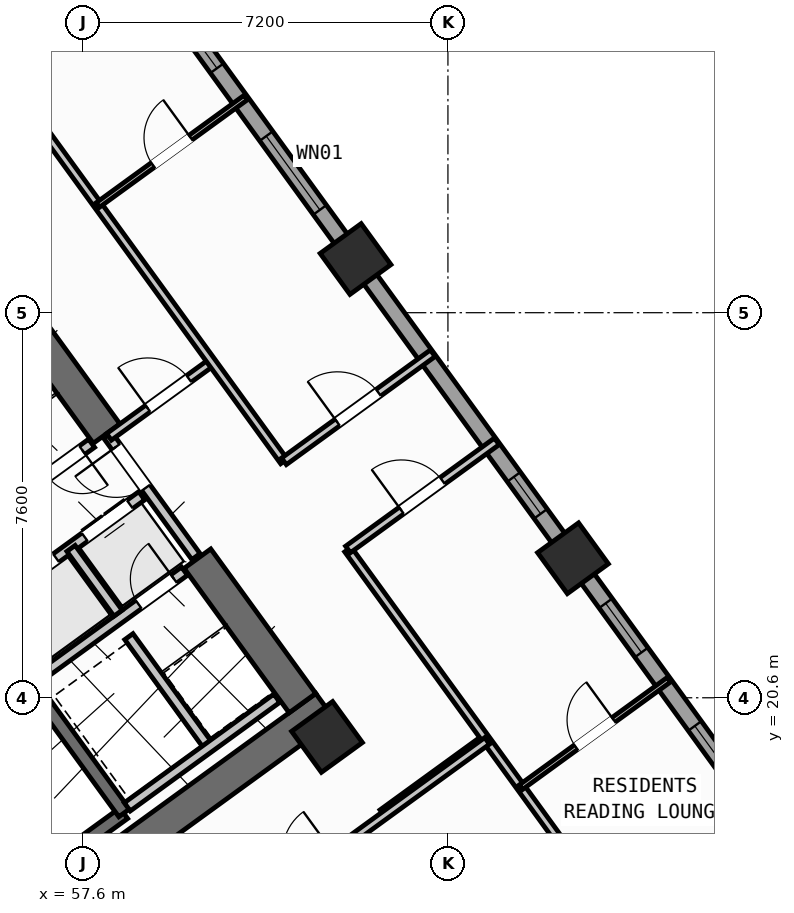
"""IFC4 building model, lengths in metres.
Left out: names, types, materials, properties, quantities, classifications, styles, units other than length and angle.
Written with IfcOpenShell. Run it as: python <this file> out.ifc"""

import sys

from ifc_helpers import new_model, si_unit, direction, frame, frame_2d, origin, origin_2d, place, context, subcontext, project, spatial, rectangle, hollow_rectangle, extrude, source, transform, mapped, element, fill, save


model = new_model("IFC4")
c1 = context("Model", 3, precision=1e-05, world=origin(), true_north=direction((0.0, 1.0)))
c2 = subcontext(c1, "Body", "Model", "MODEL_VIEW")
j1 = project(units=[si_unit("LENGTHUNIT", "METRE"), si_unit("PLANEANGLEUNIT", "RADIAN")], contexts=[c1])
p1 = place(None, origin())
s1 = spatial("IfcSite", under=j1, at=p1, CompositionType="ELEMENT")
p2 = place(p1, origin())
s2 = spatial("IfcBuilding", under=s1, at=p2, CompositionType="ELEMENT")
p3 = place(p2, frame((0.0, 0.0, 56.4)))
s3 = spatial("IfcBuildingStorey", under=s2, at=p3, CompositionType="ELEMENT", Elevation=56.4)
p4 = place(p3, frame((52.318, 13.11, 0.0), z_axis=(0.0, 0.0, 1.0), x_axis=(0.809019445368, 0.587781878776, 0.0)))
e1 = element("IfcWall", 1, at=p4, inside=s3, PredefinedType="SHEAR", context=c2, shape_type="SweptSolid", body=[
    extrude(rectangle(XDim=12.44, YDim=0.65, at=frame_2d((6.22, 0.0))), origin(), (0.0, 0.0, 1.0), 3.35),
])
p5 = place(p3, frame((61.929, 20.494, 0.0), z_axis=(0.0, 0.0, 1.0), x_axis=(-0.58782982593, 0.808984607855, 0.0)))
e2 = element("IfcWall", 2, at=p5, inside=s3, PredefinedType="SHEAR", context=c2, shape_type="SweptSolid", body=[
    extrude(rectangle(XDim=3.525, YDim=0.65, at=frame_2d((1.762, 0.0))), origin(), (0.0, 0.0, 1.0), 3.35),
])
p6 = place(p3, frame((58.064, 25.813, 0.0), z_axis=(0.0, 0.0, 1.0), x_axis=(-0.58777996584, 0.809020835181, 0.0)))
e3 = element("IfcWall", 3, at=p6, inside=s3, PredefinedType="SHEAR", context=c2, shape_type="SweptSolid", body=[
    extrude(rectangle(XDim=6.375, YDim=0.65, at=frame_2d((3.188, 0.0))), origin(), (0.0, 0.0, 1.0), 3.35),
])
m1 = source(origin(), c2, "Body", "SweptSolid", [
    extrude(hollow_rectangle(XDim=1.0, YDim=1.0, WallThickness=0.04, at=origin_2d()), origin(), (0.0, 0.0, 1.0), 3.6),
])
for number, where, z_axis, x_axis in (
    (4, (62.414, 19.827, 0.0), (0.0, 0.0, 1.0), (0.809, 0.588, 0.0)),
    (5, (67.268, 23.354, 0.0), (0.0, 0.0, 1.0), (0.809, 0.588, 0.0)),
    (6, (62.977, 29.259, 0.0), (0.0, 0.0, 1.0), (0.809, 0.588, 0.0)),
):
    element("IfcColumn", number, at=place(p3, frame(where, z_axis=z_axis, x_axis=x_axis)), inside=s3, PredefinedType="COLUMN", context=c2, shape_type="MappedRepresentation", body=[
        mapped(m1, transform((0.0, 0.0, 0.0), scale=1.0)),
    ])
p7 = place(p3, frame((43.938, 25.192, 0.0), z_axis=(0.0, 0.0, 1.0), x_axis=(0.809016324578, 0.587786174187, 0.0)))
e7 = element("IfcWall", 7, at=p7, inside=s3, PredefinedType="STANDARD", context=c2, shape_type="SweptSolid", body=[
    extrude(rectangle(XDim=17.587, YDim=0.32, at=frame_2d((8.794, 0.0))), origin(), (0.0, 0.0, 1.0), 3.35),
])
p8 = place(p7, frame((14.914, 0.0, 0.0)))
e8 = element("IfcOpeningElement", 8, at=p8, cuts=e7, PredefinedType="OPENING", context=c2, shape_type="SweptSolid", body=[
    extrude(rectangle(XDim=1.05, YDim=2.15, at=frame_2d((0.525, 1.075))), frame((0.0, 0.17, 0.0), z_axis=(0.0, -1.0, 0.0), x_axis=(1.0, 0.0, 0.0)), (0.0, 0.0, 1.0), 0.34),
])
p9 = place(p7, frame((2.169, 0.0, 0.8)))
e9 = element("IfcOpeningElement", 9, at=p9, cuts=e7, PredefinedType="OPENING", context=c2, shape_type="SweptSolid", body=[
    extrude(rectangle(XDim=2.1, YDim=1.55, at=frame_2d((1.05, 0.775))), frame((0.0, 0.17, 0.0), z_axis=(0.0, -1.0, 0.0), x_axis=(1.0, 0.0, 0.0)), (0.0, 0.0, 1.0), 0.34),
])
p10 = place(p7, frame((7.319, 0.0, 0.8)))
e10 = element("IfcOpeningElement", 10, at=p10, cuts=e7, PredefinedType="OPENING", context=c2, shape_type="SweptSolid", body=[
    extrude(rectangle(XDim=2.1, YDim=1.55, at=frame_2d((1.05, 0.775))), frame((0.0, 0.17, 0.0), z_axis=(0.0, -1.0, 0.0), x_axis=(1.0, 0.0, 0.0)), (0.0, 0.0, 1.0), 0.34),
])
p11 = place(p3, frame((58.455, 35.484, 0.0), z_axis=(0.0, 0.0, 1.0), x_axis=(0.587783625747, -0.809018176127, 0.0)))
e11 = element("IfcWall", 11, at=p11, inside=s3, PredefinedType="STANDARD", context=c2, shape_type="SweptSolid", body=[
    extrude(rectangle(XDim=21.587, YDim=0.32, at=frame_2d((10.794, 0.0))), origin(), (0.0, 0.0, 1.0), 2.725),
])
p12 = place(p11, frame((1.54, 0.0, 0.85)))
e12 = element("IfcOpeningElement", 12, at=p12, cuts=e11, PredefinedType="OPENING", context=c2, shape_type="SweptSolid", body=[
    extrude(rectangle(XDim=1.5, YDim=1.5, at=frame_2d((0.75, 0.75))), frame((0.0, 0.17, 0.0), z_axis=(0.0, -1.0, 0.0), x_axis=(1.0, 0.0, 0.0)), (0.0, 0.0, 1.0), 0.34),
])
p13 = place(p11, frame((4.695, 0.0, 0.85)))
e13 = element("IfcOpeningElement", 13, at=p13, cuts=e11, PredefinedType="OPENING", context=c2, shape_type="SweptSolid", body=[
    extrude(rectangle(XDim=1.8, YDim=1.5, at=frame_2d((0.9, 0.75))), frame((0.0, 0.17, 0.0), z_axis=(0.0, -1.0, 0.0), x_axis=(1.0, 0.0, 0.0)), (0.0, 0.0, 1.0), 0.34),
])
p14 = place(p11, frame((13.009, 0.0, 1.0)))
e14 = element("IfcOpeningElement", 14, at=p14, cuts=e11, PredefinedType="OPENING", context=c2, shape_type="SweptSolid", body=[
    extrude(rectangle(XDim=0.9, YDim=1.25, at=frame_2d((0.45, 0.625))), frame((0.0, 0.17, 0.0), z_axis=(0.0, -1.0, 0.0), x_axis=(1.0, 0.0, 0.0)), (0.0, 0.0, 1.0), 0.34),
])
p15 = place(p11, frame((16.092, 0.0, 0.95)))
e15 = element("IfcOpeningElement", 15, at=p15, cuts=e11, PredefinedType="OPENING", context=c2, shape_type="SweptSolid", body=[
    extrude(rectangle(XDim=1.2, YDim=1.4, at=frame_2d((0.6, 0.7))), frame((0.0, 0.17, 0.0), z_axis=(0.0, -1.0, 0.0), x_axis=(1.0, 0.0, 0.0)), (0.0, 0.0, 1.0), 0.34),
])
p16 = place(p11, frame((19.085, 0.0, 1.0)))
e16 = element("IfcOpeningElement", 16, at=p16, cuts=e11, PredefinedType="OPENING", context=c2, shape_type="SweptSolid", body=[
    extrude(rectangle(XDim=0.9, YDim=1.25, at=frame_2d((0.45, 0.625))), frame((0.0, 0.17, 0.0), z_axis=(0.0, -1.0, 0.0), x_axis=(1.0, 0.0, 0.0)), (0.0, 0.0, 1.0), 0.34),
])
p17 = place(p3, frame((52.472, 14.013, 0.0), z_axis=(0.0, 0.0, 1.0), x_axis=(0.809028366311, 0.587769599847, 0.0)))
e17 = element("IfcWall", 17, at=p17, inside=s3, PredefinedType="SHEAR", context=c2, shape_type="SweptSolid", body=[
    extrude(rectangle(XDim=7.33, YDim=0.26, at=frame_2d((3.665, 0.0))), origin(), (0.0, 0.0, 1.0), 3.35),
])
p18 = place(p3, frame((58.41, 18.327, 0.0), z_axis=(0.0, 0.0, 1.0), x_axis=(-0.58776738483, 0.809029975545, 0.0)))
e18 = element("IfcWall", 18, at=p18, inside=s3, PredefinedType="SHEAR", context=c2, shape_type="SweptSolid", body=[
    extrude(rectangle(XDim=3.16, YDim=0.26, at=frame_2d((1.58, 0.0))), origin(), (0.0, 0.0, 1.0), 3.35),
])
p19 = place(p3, frame((56.553, 20.884, 0.0), z_axis=(0.0, 0.0, 1.0), x_axis=(0.809035789462, 0.587759382205, 0.0)))
e19 = element("IfcWall", 19, at=p19, inside=s3, PredefinedType="STANDARD", context=c2, shape_type="SweptSolid", body=[
    extrude(rectangle(XDim=3.768, YDim=0.2, at=frame_2d((1.884, 0.0))), origin(), (0.0, 0.0, 1.0), 3.34),
])
p20 = place(p19, frame((2.65, 0.0, 0.0)))
e20 = element("IfcOpeningElement", 20, at=p20, cuts=e19, PredefinedType="OPENING", context=c2, shape_type="SweptSolid", body=[
    extrude(rectangle(XDim=0.86, YDim=2.05, at=frame_2d((0.43, 1.025))), frame((0.0, 0.11, 0.0), z_axis=(0.0, -1.0, 0.0), x_axis=(1.0, 0.0, 0.0)), (0.0, 0.0, 1.0), 0.22),
])
p21 = place(p3, frame((54.421, 21.436, 0.0), z_axis=(0.0, 0.0, 1.0), x_axis=(0.809013710463, 0.587789772183, 0.0)))
e21 = element("IfcWall", 21, at=p21, inside=s3, PredefinedType="STANDARD", context=c2, shape_type="SweptSolid", body=[
    extrude(rectangle(XDim=5.36, YDim=0.2, at=frame_2d((2.68, 0.0))), origin(), (0.0, 0.0, 1.0), 3.34),
])
p22 = place(p21, frame((0.37, 0.0, 0.0)))
e22 = element("IfcOpeningElement", 22, at=p22, cuts=e21, PredefinedType="OPENING", context=c2, shape_type="SweptSolid", body=[
    extrude(rectangle(XDim=1.1, YDim=2.15, at=frame_2d((0.55, 1.075))), frame((0.0, 0.11, 0.0), z_axis=(0.0, -1.0, 0.0), x_axis=(1.0, 0.0, 0.0)), (0.0, 0.0, 1.0), 0.22),
])
p23 = place(p21, frame((2.17, 0.0, 0.0)))
e23 = element("IfcOpeningElement", 23, at=p23, cuts=e21, PredefinedType="OPENING", context=c2, shape_type="SweptSolid", body=[
    extrude(rectangle(XDim=1.1, YDim=2.15, at=frame_2d((0.55, 1.075))), frame((0.0, 0.11, 0.0), z_axis=(0.0, -1.0, 0.0), x_axis=(1.0, 0.0, 0.0)), (0.0, 0.0, 1.0), 0.22),
])
p24 = place(p21, frame((3.97, 0.0, 0.0)))
e24 = element("IfcOpeningElement", 24, at=p24, cuts=e21, PredefinedType="OPENING", context=c2, shape_type="SweptSolid", body=[
    extrude(rectangle(XDim=1.1, YDim=2.15, at=frame_2d((0.55, 1.075))), frame((0.0, 0.11, 0.0), z_axis=(0.0, -1.0, 0.0), x_axis=(1.0, 0.0, 0.0)), (0.0, 0.0, 1.0), 0.22),
])
p25 = place(p3, frame((58.29, 22.27, 0.0), z_axis=(0.0, 0.0, 1.0), x_axis=(-0.587840865826, 0.808976585857, 0.0)))
e25 = element("IfcWall", 25, at=p25, inside=s3, PredefinedType="STANDARD", context=c2, shape_type="SweptSolid", body=[
    extrude(rectangle(XDim=1.58, YDim=0.2, at=frame_2d((0.79, 0.0))), origin(), (0.0, 0.0, 1.0), 3.34),
])
p26 = place(p3, frame((60.067, 19.655, 0.0), z_axis=(0.0, 0.0, 1.0), x_axis=(-0.587800520745, 0.809005900975, 0.0)))
e26 = element("IfcWall", 26, at=p26, inside=s3, PredefinedType="STANDARD", context=c2, shape_type="SweptSolid", body=[
    extrude(rectangle(XDim=2.66, YDim=0.2, at=frame_2d((1.33, 0.0))), origin(), (0.0, 0.0, 1.0), 3.34),
])
p27 = place(p3, frame((58.472, 18.447, 0.0), z_axis=(0.0, 0.0, 1.0), x_axis=(0.809022487728, 0.587777691266, 0.0)))
e27 = element("IfcWall", 27, at=p27, inside=s3, PredefinedType="STANDARD", context=c2, shape_type="SweptSolid", body=[
    extrude(rectangle(XDim=3.648, YDim=0.2, at=frame_2d((1.824, 0.0))), origin(), (0.0, 0.0, 1.0), 3.34),
])
p28 = place(p3, frame((53.425, 22.468, 0.0), z_axis=(0.0, 0.0, 1.0), x_axis=(0.80902705128, 0.587771409902, 0.0)))
e28 = element("IfcWall", 28, at=p28, inside=s3, PredefinedType="STANDARD", context=c2, shape_type="SweptSolid", body=[
    extrude(rectangle(XDim=5.368, YDim=0.2, at=frame_2d((2.684, 0.0))), origin(), (0.0, 0.0, 1.0), 3.34),
])
p29 = place(p28, frame((4.28, 0.0, 0.0)))
e29 = element("IfcOpeningElement", 29, at=p29, cuts=e28, PredefinedType="OPENING", context=c2, shape_type="SweptSolid", body=[
    extrude(rectangle(XDim=0.86, YDim=2.05, at=frame_2d((0.43, 1.025))), frame((0.0, 0.11, 0.0), z_axis=(0.0, -1.0, 0.0), x_axis=(1.0, 0.0, 0.0)), (0.0, 0.0, 1.0), 0.22),
])
p30 = place(p28, frame((1.45, 0.0, 0.0)))
e30 = element("IfcOpeningElement", 30, at=p30, cuts=e28, PredefinedType="OPENING", context=c2, shape_type="SweptSolid", body=[
    extrude(rectangle(XDim=0.86, YDim=2.05, at=frame_2d((0.43, 1.025))), frame((0.0, 0.11, 0.0), z_axis=(0.0, -1.0, 0.0), x_axis=(1.0, 0.0, 0.0)), (0.0, 0.0, 1.0), 0.22),
])
p31 = place(p3, frame((59.827, 23.386, 0.0), z_axis=(0.0, 0.0, 1.0), x_axis=(-0.587803840107, 0.809003489211, 0.0)))
e31 = element("IfcWall", 31, at=p31, inside=s3, PredefinedType="STANDARD", context=c2, shape_type="SweptSolid", body=[
    extrude(rectangle(XDim=2.96, YDim=0.2, at=frame_2d((1.48, 0.0))), origin(), (0.0, 0.0, 1.0), 3.34),
])
p32 = place(p31, frame((1.68, 0.0, 0.0)))
e32 = element("IfcOpeningElement", 32, at=p32, cuts=e31, PredefinedType="OPENING", context=c2, shape_type="SweptSolid", body=[
    extrude(rectangle(XDim=1.0, YDim=2.1, at=frame_2d((0.5, 1.05))), frame((0.0, 0.11, 0.0), z_axis=(0.0, -1.0, 0.0), x_axis=(1.0, 0.0, 0.0)), (0.0, 0.0, 1.0), 0.22),
])
p33 = place(p3, frame((63.507, 18.322, 0.0), z_axis=(0.0, 0.0, 1.0), x_axis=(0.809034604122, 0.587761013791, 0.0)))
e33 = element("IfcWall", 33, at=p33, inside=s3, PredefinedType="PARTITIONING", context=c2, shape_type="SweptSolid", body=[
    extrude(rectangle(XDim=2.51, YDim=0.16, at=frame_2d((1.255, 0.0))), origin(), (0.0, 0.0, 1.0), 3.34),
])
p34 = place(p3, frame((58.111, 25.749, 0.0), z_axis=(0.0, 0.0, 1.0), x_axis=(0.809000999347, 0.58780726693, 0.0)))
e34 = element("IfcWall", 34, at=p34, inside=s3, PredefinedType="PARTITIONING", context=c2, shape_type="SweptSolid", body=[
    extrude(rectangle(XDim=2.51, YDim=0.16, at=frame_2d((1.255, 0.0))), origin(), (0.0, 0.0, 1.0), 2.725),
])
p35 = place(p34, frame((0.95, 0.0, 0.0)))
e35 = element("IfcOpeningElement", 35, at=p35, cuts=e34, PredefinedType="OPENING", context=c2, shape_type="SweptSolid", body=[
    extrude(rectangle(XDim=1.0, YDim=2.1, at=frame_2d((0.5, 1.05))), frame((0.0, 0.09, 0.0), z_axis=(0.0, -1.0, 0.0), x_axis=(1.0, 0.0, 0.0)), (0.0, 0.0, 1.0), 0.18),
])
p36 = place(p3, frame((68.353, 15.922, 0.0), z_axis=(0.0, 0.0, 1.0), x_axis=(-0.587784007866, 0.809017898502, 0.0)))
e36 = element("IfcWall", 36, at=p36, inside=s3, PredefinedType="PARTITIONING", context=c2, shape_type="SweptSolid", body=[
    extrude(rectangle(XDim=9.4, YDim=0.16, at=frame_2d((4.7, 0.0))), origin(), (0.0, 0.0, 1.0), 3.34),
])
p37 = place(p3, frame((61.564, 25.266, 0.0), z_axis=(0.0, 0.0, 1.0), x_axis=(-0.587792629712, 0.809011634314, 0.0)))
e37 = element("IfcWall", 37, at=p37, inside=s3, PredefinedType="PARTITIONING", context=c2, shape_type="SweptSolid", body=[
    extrude(rectangle(XDim=10.15, YDim=0.16, at=frame_2d((5.075, 0.0))), origin(), (0.0, 0.0, 1.0), 3.34),
])
p38 = place(p3, frame((62.828, 23.527, 0.0), z_axis=(0.0, 0.0, 1.0), x_axis=(0.809003564202, 0.587803736896, 0.0)))
e38 = element("IfcWall", 38, at=p38, inside=s3, PredefinedType="PARTITIONING", context=c2, shape_type="SweptSolid", body=[
    extrude(rectangle(XDim=3.63, YDim=0.16, at=frame_2d((1.815, 0.0))), origin(), (0.0, 0.0, 1.0), 3.34),
])
p39 = place(p38, frame((1.305, 0.0, 0.0)))
e39 = element("IfcOpeningElement", 39, at=p39, cuts=e38, PredefinedType="OPENING", context=c2, shape_type="SweptSolid", body=[
    extrude(rectangle(XDim=1.0, YDim=2.1, at=frame_2d((0.5, 1.05))), frame((0.0, 0.09, 0.0), z_axis=(0.0, -1.0, 0.0), x_axis=(1.0, 0.0, 0.0)), (0.0, 0.0, 1.0), 0.18),
])
p40 = place(p3, frame((61.564, 25.266, 0.0), z_axis=(0.0, 0.0, 1.0), x_axis=(0.809012309495, 0.587791700422, 0.0)))
e40 = element("IfcWall", 40, at=p40, inside=s3, PredefinedType="PARTITIONING", context=c2, shape_type="SweptSolid", body=[
    extrude(rectangle(XDim=3.63, YDim=0.16, at=frame_2d((1.815, 0.0))), origin(), (0.0, 0.0, 1.0), 3.34),
])
p41 = place(p40, frame((1.305, 0.0, 0.0)))
e41 = element("IfcOpeningElement", 41, at=p41, cuts=e40, PredefinedType="OPENING", context=c2, shape_type="SweptSolid", body=[
    extrude(rectangle(XDim=1.0, YDim=2.1, at=frame_2d((0.5, 1.05))), frame((0.0, 0.09, 0.0), z_axis=(0.0, -1.0, 0.0), x_axis=(1.0, 0.0, 0.0)), (0.0, 0.0, 1.0), 0.18),
])
p42 = place(p3, frame((57.889, 30.324, 0.0), z_axis=(0.0, 0.0, 1.0), x_axis=(0.809005039917, 0.58780170584, 0.0)))
e42 = element("IfcWall", 42, at=p42, inside=s3, PredefinedType="PARTITIONING", context=c2, shape_type="SweptSolid", body=[
    extrude(rectangle(XDim=3.61, YDim=0.11, at=frame_2d((1.805, 0.0))), origin(), (0.0, 0.0, 1.0), 3.34),
])
p43 = place(p42, frame((1.345, 0.0, 0.0)))
e43 = element("IfcOpeningElement", 43, at=p43, cuts=e42, PredefinedType="OPENING", context=c2, shape_type="SweptSolid", body=[
    extrude(rectangle(XDim=0.92, YDim=2.08, at=frame_2d((0.46, 1.04))), frame((0.0, 0.065, 0.0), z_axis=(0.0, -1.0, 0.0), x_axis=(1.0, 0.0, 0.0)), (0.0, 0.0, 1.0), 0.13),
])
p44 = place(p3, frame((66.238, 18.833, 0.0), z_axis=(0.0, 0.0, 1.0), x_axis=(0.809013833588, 0.587789602718, 0.0)))
e44 = element("IfcWall", 44, at=p44, inside=s3, PredefinedType="PARTITIONING", context=c2, shape_type="SweptSolid", body=[
    extrude(rectangle(XDim=3.61, YDim=0.11, at=frame_2d((1.805, 0.0))), origin(), (0.0, 0.0, 1.0), 3.34),
])
p45 = place(p44, frame((1.345, 0.0, 0.0)))
e45 = element("IfcOpeningElement", 45, at=p45, cuts=e44, PredefinedType="OPENING", context=c2, shape_type="SweptSolid", body=[
    extrude(rectangle(XDim=0.92, YDim=2.08, at=frame_2d((0.46, 1.04))), frame((0.0, 0.065, 0.0), z_axis=(0.0, -1.0, 0.0), x_axis=(1.0, 0.0, 0.0)), (0.0, 0.0, 1.0), 0.13),
])
p46 = place(p3, frame((53.705, 11.126, 0.0), z_axis=(0.0, 0.0, 1.0), x_axis=(0.809014504436, 0.587788679384, 0.0)))
e46 = element("IfcWall", 46, at=p46, inside=s3, PredefinedType="PARTITIONING", context=c2, shape_type="SweptSolid", body=[
    extrude(rectangle(XDim=14.67, YDim=0.16, at=frame_2d((7.335, 0.0))), origin(), (0.0, 0.0, 1.0), 3.34),
])
p47 = place(p46, frame((3.215, 0.0, 0.0)))
e47 = element("IfcOpeningElement", 47, at=p47, cuts=e46, PredefinedType="OPENING", context=c2, shape_type="SweptSolid", body=[
    extrude(rectangle(XDim=1.0, YDim=2.1, at=frame_2d((0.5, 1.05))), frame((0.0, 0.09, 0.0), z_axis=(0.0, -1.0, 0.0), x_axis=(1.0, 0.0, 0.0)), (0.0, 0.0, 1.0), 0.18),
])
p48 = place(p46, frame((9.915, 0.0, 0.0)))
e48 = element("IfcOpeningElement", 48, at=p48, cuts=e46, PredefinedType="OPENING", context=c2, shape_type="SweptSolid", body=[
    extrude(rectangle(XDim=1.0, YDim=2.1, at=frame_2d((0.5, 1.05))), frame((0.0, 0.09, 0.0), z_axis=(0.0, -1.0, 0.0), x_axis=(1.0, 0.0, 0.0)), (0.0, 0.0, 1.0), 0.18),
])
m2 = source(origin(), c2, "Body", "SweptSolid", [
    extrude(rectangle(XDim=1.5, YDim=1.5, at=frame_2d((0.75, 0.75))), frame((0.0, 0.03, 0.0), z_axis=(0.0, -1.0, 0.0), x_axis=(1.0, 0.0, 0.0)), (0.0, 0.0, 1.0), 0.06),
])
p49 = place(p12, origin())
e49 = element("IfcWindow", 49, at=p49, inside=s3, PartitioningType="SINGLE_PANEL", PredefinedType="WINDOW", context=c2, shape_type="MappedRepresentation", body=[
    mapped(m2, transform((0.0, 0.0, 0.0), scale=1.0)),
])
fill(e12, e49)
m3 = source(origin(), c2, "Body", "SweptSolid", [
    extrude(rectangle(XDim=1.8, YDim=1.5, at=frame_2d((0.9, 0.75))), frame((0.0, 0.03, 0.0), z_axis=(0.0, -1.0, 0.0), x_axis=(1.0, 0.0, 0.0)), (0.0, 0.0, 1.0), 0.06),
])
p50 = place(p13, origin())
e50 = element("IfcWindow", 50, at=p50, inside=s3, PartitioningType="SINGLE_PANEL", PredefinedType="WINDOW", context=c2, shape_type="MappedRepresentation", body=[
    mapped(m3, transform((0.0, 0.0, 0.0), scale=1.0)),
])
fill(e13, e50)
m4 = source(origin(), c2, "Body", "SweptSolid", [
    extrude(rectangle(XDim=0.9, YDim=1.25, at=frame_2d((0.45, 0.625))), frame((0.0, 0.03, 0.0), z_axis=(0.0, -1.0, 0.0), x_axis=(1.0, 0.0, 0.0)), (0.0, 0.0, 1.0), 0.06),
])
p51 = place(p14, origin())
e51 = element("IfcWindow", 51, at=p51, inside=s3, PartitioningType="SINGLE_PANEL", PredefinedType="WINDOW", context=c2, shape_type="MappedRepresentation", body=[
    mapped(m4, transform((0.0, 0.0, 0.0), scale=1.0)),
])
fill(e14, e51)
m5 = source(origin(), c2, "Body", "SweptSolid", [
    extrude(rectangle(XDim=1.2, YDim=1.4, at=frame_2d((0.6, 0.7))), frame((0.0, 0.03, 0.0), z_axis=(0.0, -1.0, 0.0), x_axis=(1.0, 0.0, 0.0)), (0.0, 0.0, 1.0), 0.06),
])
p52 = place(p15, origin())
e52 = element("IfcWindow", 52, at=p52, inside=s3, PartitioningType="SINGLE_PANEL", PredefinedType="WINDOW", context=c2, shape_type="MappedRepresentation", body=[
    mapped(m5, transform((0.0, 0.0, 0.0), scale=1.0)),
])
fill(e15, e52)
p53 = place(p16, origin())
e53 = element("IfcWindow", 53, at=p53, inside=s3, PartitioningType="SINGLE_PANEL", PredefinedType="WINDOW", context=c2, shape_type="MappedRepresentation", body=[
    mapped(m4, transform((0.0, 0.0, 0.0), scale=1.0)),
])
fill(e16, e53)
m6 = source(origin(), c2, "Body", "SweptSolid", [
    extrude(rectangle(XDim=1.1, YDim=2.15, at=frame_2d((0.55, 1.075))), frame((0.0, 0.025, 0.0), z_axis=(0.0, -1.0, 0.0), x_axis=(1.0, 0.0, 0.0)), (0.0, 0.0, 1.0), 0.05),
])
p54 = place(p23, origin())
e54 = element("IfcDoor", 54, at=p54, inside=s3, OperationType="DOUBLE_DOOR_SLIDING", PredefinedType="DOOR", context=c2, shape_type="MappedRepresentation", body=[
    mapped(m6, transform((0.0, 0.0, 0.0), scale=1.0)),
])
fill(e23, e54)
p55 = place(p24, origin())
e55 = element("IfcDoor", 55, at=p55, inside=s3, OperationType="DOUBLE_DOOR_SLIDING", PredefinedType="DOOR", context=c2, shape_type="MappedRepresentation", body=[
    mapped(m6, transform((0.0, 0.0, 0.0), scale=1.0)),
])
fill(e24, e55)
m7 = source(origin(), c2, "Body", "SweptSolid", [
    extrude(rectangle(XDim=0.86, YDim=2.05, at=frame_2d((0.43, 1.025))), frame((0.0, 0.025, 0.0), z_axis=(0.0, -1.0, 0.0), x_axis=(1.0, 0.0, 0.0)), (0.0, 0.0, 1.0), 0.05),
])
p56 = place(p20, origin())
e56 = element("IfcDoor", 56, at=p56, inside=s3, OperationType="SINGLE_SWING_RIGHT", PredefinedType="DOOR", context=c2, shape_type="MappedRepresentation", body=[
    mapped(m7, transform((0.0, 0.0, 0.0), scale=1.0)),
])
fill(e20, e56)
p57 = place(p29, frame((0.86, 0.0, 0.0), z_axis=(0.0, 0.0, 1.0), x_axis=(-1.0, 0.0, 0.0)))
e57 = element("IfcDoor", 57, at=p57, inside=s3, OperationType="SINGLE_SWING_LEFT", PredefinedType="DOOR", context=c2, shape_type="MappedRepresentation", body=[
    mapped(m7, transform((0.0, 0.0, 0.0), scale=1.0)),
])
fill(e29, e57)
m8 = source(origin(), c2, "Body", "SweptSolid", [
    extrude(rectangle(XDim=1.0, YDim=2.1, at=frame_2d((0.5, 1.05))), frame((0.0, 0.025, 0.0), z_axis=(0.0, -1.0, 0.0), x_axis=(1.0, 0.0, 0.0)), (0.0, 0.0, 1.0), 0.05),
])
p58 = place(p35, origin())
e58 = element("IfcDoor", 58, at=p58, inside=s3, OperationType="SINGLE_SWING_LEFT", PredefinedType="DOOR", context=c2, shape_type="MappedRepresentation", body=[
    mapped(m8, transform((0.0, 0.0, 0.0), scale=1.0)),
])
fill(e35, e58)
p59 = place(p32, origin())
e59 = element("IfcDoor", 59, at=p59, inside=s3, OperationType="SINGLE_SWING_RIGHT", PredefinedType="DOOR", context=c2, shape_type="MappedRepresentation", body=[
    mapped(m8, transform((0.0, 0.0, 0.0), scale=1.0)),
])
fill(e32, e59)
p60 = place(p41, origin())
e60 = element("IfcDoor", 60, at=p60, inside=s3, OperationType="SINGLE_SWING_LEFT", PredefinedType="DOOR", context=c2, shape_type="MappedRepresentation", body=[
    mapped(m8, transform((0.0, 0.0, 0.0), scale=1.0)),
])
fill(e41, e60)
m9 = source(origin(), c2, "Body", "SweptSolid", [
    extrude(rectangle(XDim=0.92, YDim=2.08, at=frame_2d((0.46, 1.04))), frame((0.0, 0.025, 0.0), z_axis=(0.0, -1.0, 0.0), x_axis=(1.0, 0.0, 0.0)), (0.0, 0.0, 1.0), 0.05),
])
p61 = place(p43, origin())
e61 = element("IfcDoor", 61, at=p61, inside=s3, OperationType="SINGLE_SWING_RIGHT", PredefinedType="DOOR", context=c2, shape_type="MappedRepresentation", body=[
    mapped(m9, transform((0.0, 0.0, 0.0), scale=1.0)),
])
fill(e43, e61)
p62 = place(p39, origin())
e62 = element("IfcDoor", 62, at=p62, inside=s3, OperationType="SINGLE_SWING_LEFT", PredefinedType="DOOR", context=c2, shape_type="MappedRepresentation", body=[
    mapped(m8, transform((0.0, 0.0, 0.0), scale=1.0)),
])
fill(e39, e62)
p63 = place(p45, origin())
e63 = element("IfcDoor", 63, at=p63, inside=s3, OperationType="SINGLE_SWING_RIGHT", PredefinedType="DOOR", context=c2, shape_type="MappedRepresentation", body=[
    mapped(m9, transform((0.0, 0.0, 0.0), scale=1.0)),
])
fill(e45, e63)
save(model, sys.argv[1])
